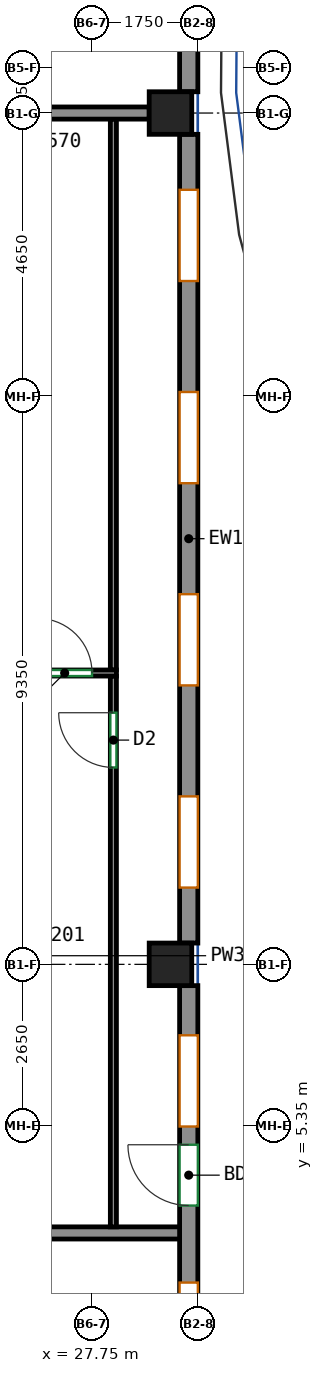
"""IFC4 building model, lengths in metres.
Left out: names, types, materials, properties, quantities, classifications, styles, units other than length and angle.
Written with IfcOpenShell. Run it as: python <this file> out.ifc"""

import sys

from ifc_helpers import new_model, si_unit, direction, frame, frame_2d, origin, origin_2d, place, context, subcontext, project, spatial, rectangle, extrude, source, transform, mapped, element, fill, save


model = new_model("IFC4")
c1 = context("Model", 3, precision=1e-05, world=origin(), true_north=direction((0.0, 1.0)))
c2 = subcontext(c1, "Body", "Model", "MODEL_VIEW")
j1 = project(units=[si_unit("LENGTHUNIT", "METRE"), si_unit("PLANEANGLEUNIT", "RADIAN")], contexts=[c1])
p1 = place(None, origin())
s1 = spatial("IfcSite", under=j1, at=p1, CompositionType="ELEMENT")
p2 = place(p1, origin())
s2 = spatial("IfcBuilding", under=s1, at=p2, CompositionType="ELEMENT")
p3 = place(p2, frame((0.0, 0.0, 256.0)))
s3 = spatial("IfcBuildingStorey", under=s2, at=p3, CompositionType="ELEMENT", Elevation=256.0)
m1 = source(origin(), c2, "Body", "SweptSolid", [
    extrude(rectangle(XDim=0.7, YDim=0.7, at=origin_2d()), origin(), (0.0, 0.0, 1.0), 3.12),
])
for number, where, z_axis, x_axis in (
    (1, (29.05, 8.0, 0.0), (0.0, 0.0, 1.0), (1.0, 0.0, 0.0)),
    (2, (29.05, 22.0, 0.0), (0.0, 0.0, 1.0), (1.0, 0.0, 0.0)),
):
    element("IfcColumn", number, at=place(p3, frame(where, z_axis=z_axis, x_axis=x_axis)), inside=s3, PredefinedType="COLUMN", context=c2, shape_type="MappedRepresentation", body=[
        mapped(m1, transform((0.0, 0.0, 0.0))),
    ])
m2 = source(origin(), c2, "Body", "SweptSolid", [
    extrude(rectangle(XDim=8.133, YDim=0.3, at=frame_2d((4.067, 0.0))), origin(), (0.0, 0.0, 1.0), 3.12),
])
p4 = place(p3, frame((29.35, -0.483, 0.0), z_axis=(0.0, 0.0, 1.0), x_axis=(0.0, 1.0, 0.0)))
e3 = element("IfcWall", 3, at=p4, inside=s3, PredefinedType="SOLIDWALL", context=c2, shape_type="MappedRepresentation", body=[
    mapped(m2, transform((0.0, 0.0, 0.0))),
])
p5 = place(p4, frame((1.75, 0.0, 0.8)))
e4 = element("IfcOpeningElement", 4, at=p5, cuts=e3, PredefinedType="OPENING", context=c2, shape_type="SweptSolid", body=[
    extrude(rectangle(XDim=1.5, YDim=2.05, at=frame_2d((0.75, 1.025))), frame((0.0, 0.16, 0.0), z_axis=(0.0, -1.0, 0.0), x_axis=(1.0, 0.0, 0.0)), (0.0, 0.0, 1.0), 0.32),
])
p6 = place(p4, frame((5.817, 0.0, 0.8)))
e5 = element("IfcOpeningElement", 5, at=p6, cuts=e3, PredefinedType="OPENING", context=c2, shape_type="SweptSolid", body=[
    extrude(rectangle(XDim=1.5, YDim=2.05, at=frame_2d((0.75, 1.025))), frame((0.0, 0.16, 0.0), z_axis=(0.0, -1.0, 0.0), x_axis=(1.0, 0.0, 0.0)), (0.0, 0.0, 1.0), 0.32),
])
p7 = place(p4, frame((4.517, 0.0, 0.0)))
e6 = element("IfcOpeningElement", 6, at=p7, cuts=e3, PredefinedType="OPENING", context=c2, shape_type="SweptSolid", body=[
    extrude(rectangle(XDim=1.0, YDim=2.1, at=frame_2d((0.5, 1.05))), frame((0.0, 0.16, 0.0), z_axis=(0.0, -1.0, 0.0), x_axis=(1.0, 0.0, 0.0)), (0.0, 0.0, 1.0), 0.32),
])
m3 = source(origin(), c2, "Body", "SweptSolid", [
    extrude(rectangle(XDim=13.3, YDim=0.3, at=frame_2d((6.65, 0.0))), origin(), (0.0, 0.0, 1.0), 3.12),
])
p8 = place(p3, frame((29.35, 8.35, 0.0), z_axis=(0.0, 0.0, 1.0), x_axis=(0.0, 1.0, 0.0)))
e7 = element("IfcWall", 7, at=p8, inside=s3, PredefinedType="SOLIDWALL", context=c2, shape_type="MappedRepresentation", body=[
    mapped(m3, transform((0.0, 0.0, 0.0))),
])
p9 = place(p8, frame((0.913, 0.0, 0.8)))
e8 = element("IfcOpeningElement", 8, at=p9, cuts=e7, PredefinedType="OPENING", context=c2, shape_type="SweptSolid", body=[
    extrude(rectangle(XDim=1.5, YDim=2.05, at=frame_2d((0.75, 1.025))), frame((0.0, 0.16, 0.0), z_axis=(0.0, -1.0, 0.0), x_axis=(1.0, 0.0, 0.0)), (0.0, 0.0, 1.0), 0.32),
])
p10 = place(p8, frame((4.238, 0.0, 0.8)))
e9 = element("IfcOpeningElement", 9, at=p10, cuts=e7, PredefinedType="OPENING", context=c2, shape_type="SweptSolid", body=[
    extrude(rectangle(XDim=1.5, YDim=2.05, at=frame_2d((0.75, 1.025))), frame((0.0, 0.16, 0.0), z_axis=(0.0, -1.0, 0.0), x_axis=(1.0, 0.0, 0.0)), (0.0, 0.0, 1.0), 0.32),
])
p11 = place(p8, frame((7.562, 0.0, 0.8)))
e10 = element("IfcOpeningElement", 10, at=p11, cuts=e7, PredefinedType="OPENING", context=c2, shape_type="SweptSolid", body=[
    extrude(rectangle(XDim=1.5, YDim=2.05, at=frame_2d((0.75, 1.025))), frame((0.0, 0.16, 0.0), z_axis=(0.0, -1.0, 0.0), x_axis=(1.0, 0.0, 0.0)), (0.0, 0.0, 1.0), 0.32),
])
p12 = place(p8, frame((10.887, 0.0, 0.8)))
e11 = element("IfcOpeningElement", 11, at=p12, cuts=e7, PredefinedType="OPENING", context=c2, shape_type="SweptSolid", body=[
    extrude(rectangle(XDim=1.5, YDim=2.05, at=frame_2d((0.75, 1.025))), frame((0.0, 0.16, 0.0), z_axis=(0.0, -1.0, 0.0), x_axis=(1.0, 0.0, 0.0)), (0.0, 0.0, 1.0), 0.32),
])
m4 = source(origin(), c2, "Body", "SweptSolid", [
    extrude(rectangle(XDim=4.3, YDim=0.3, at=frame_2d((2.15, 0.0))), origin(), (0.0, 0.0, 1.0), 3.12),
])
p13 = place(p3, frame((29.35, 22.35, 0.0), z_axis=(0.0, 0.0, 1.0), x_axis=(0.0, 1.0, 0.0)))
e12 = element("IfcWall", 12, at=p13, inside=s3, PredefinedType="SOLIDWALL", context=c2, shape_type="MappedRepresentation", body=[
    mapped(m4, transform((0.0, 0.0, 0.0))),
])
p14 = place(p13, frame((1.75, 0.0, 0.8)))
e13 = element("IfcOpeningElement", 13, at=p14, cuts=e12, PredefinedType="OPENING", context=c2, shape_type="SweptSolid", body=[
    extrude(rectangle(XDim=1.5, YDim=2.05, at=frame_2d((0.75, 1.025))), frame((0.0, 0.16, 0.0), z_axis=(0.0, -1.0, 0.0), x_axis=(1.0, 0.0, 0.0)), (0.0, 0.0, 1.0), 0.32),
])
p15 = place(p3, frame((20.727, 3.583, 0.0), z_axis=(0.0, 0.0, 1.0), x_axis=(1.0, 0.0, 0.0)))
e14 = element("IfcWall", 14, at=p15, inside=s3, PredefinedType="PARTITIONING", context=c2, shape_type="SweptSolid", body=[
    extrude(rectangle(XDim=8.523, YDim=0.2, at=frame_2d((4.261, 0.0))), origin(), (0.0, 0.0, 1.0), 3.12),
])
p16 = place(p3, frame((28.111, 3.683, 0.0), z_axis=(0.0, 0.0, 1.0), x_axis=(0.0, 1.0, 0.0)))
e15 = element("IfcWall", 15, at=p16, inside=s3, PredefinedType="PARTITIONING", context=c2, shape_type="SweptSolid", body=[
    extrude(rectangle(XDim=9.058, YDim=0.1, at=frame_2d((4.529, 0.0))), origin(), (0.0, 0.0, 1.0), 3.12),
])
p17 = place(p16, frame((7.555, 0.0, 0.0)))
e16 = element("IfcOpeningElement", 16, at=p17, cuts=e15, PredefinedType="OPENING", context=c2, shape_type="SweptSolid", body=[
    extrude(rectangle(XDim=0.9, YDim=2.1, at=frame_2d((0.45, 1.05))), frame((0.0, 0.06, 0.0), z_axis=(0.0, -1.0, 0.0), x_axis=(1.0, 0.0, 0.0)), (0.0, 0.0, 1.0), 0.12),
])
p18 = place(p3, frame((28.111, 12.841, 0.0), z_axis=(0.0, 0.0, 1.0), x_axis=(0.0, 1.0, 0.0)))
e17 = element("IfcWall", 17, at=p18, inside=s3, PredefinedType="PARTITIONING", context=c2, shape_type="SweptSolid", body=[
    extrude(rectangle(XDim=9.059, YDim=0.1, at=frame_2d((4.529, 0.0))), origin(), (0.0, 0.0, 1.0), 3.12),
])
p19 = place(p3, frame((20.727, 22.0, 0.0), z_axis=(0.0, 0.0, 1.0), x_axis=(1.0, 0.0, 0.0)))
e18 = element("IfcWall", 18, at=p19, inside=s3, PredefinedType="PARTITIONING", context=c2, shape_type="SweptSolid", body=[
    extrude(rectangle(XDim=7.973, YDim=0.2, at=frame_2d((3.986, 0.0))), origin(), (0.0, 0.0, 1.0), 2.57),
])
p20 = place(p3, frame((21.7, 12.791, 0.0), z_axis=(0.0, 0.0, 1.0), x_axis=(1.0, 0.0, 0.0)))
e19 = element("IfcWall", 19, at=p20, inside=s3, PredefinedType="PARTITIONING", context=c2, shape_type="SweptSolid", body=[
    extrude(rectangle(XDim=6.461, YDim=0.1, at=frame_2d((3.23, 0.0))), origin(), (0.0, 0.0, 1.0), 3.12),
])
p21 = place(p20, frame((5.16, 0.0, 0.0)))
e20 = element("IfcOpeningElement", 20, at=p21, cuts=e19, PredefinedType="OPENING", context=c2, shape_type="SweptSolid", body=[
    extrude(rectangle(XDim=0.9, YDim=2.1, at=frame_2d((0.45, 1.05))), frame((0.0, 0.06, 0.0), z_axis=(0.0, -1.0, 0.0), x_axis=(1.0, 0.0, 0.0)), (0.0, 0.0, 1.0), 0.12),
])
p22 = place(p5, origin())
e21 = element("IfcWindow", 21, at=p22, inside=s3, PartitioningType="SINGLE_PANEL", PredefinedType="WINDOW", context=c2, shape_type="SweptSolid", body=[
    extrude(rectangle(XDim=1.5, YDim=2.05, at=frame_2d((0.75, 1.025))), frame((0.0, 0.03, 0.0), z_axis=(0.0, -1.0, 0.0), x_axis=(1.0, 0.0, 0.0)), (0.0, 0.0, 1.0), 0.06),
])
fill(e4, e21)
p23 = place(p6, origin())
e22 = element("IfcWindow", 22, at=p23, inside=s3, PartitioningType="SINGLE_PANEL", PredefinedType="WINDOW", context=c2, shape_type="SweptSolid", body=[
    extrude(rectangle(XDim=1.5, YDim=2.05, at=frame_2d((0.75, 1.025))), frame((0.0, 0.03, 0.0), z_axis=(0.0, -1.0, 0.0), x_axis=(1.0, 0.0, 0.0)), (0.0, 0.0, 1.0), 0.06),
])
fill(e5, e22)
p24 = place(p7, origin())
e23 = element("IfcDoor", 23, at=p24, inside=s3, OperationType="SINGLE_SWING_RIGHT", PredefinedType="DOOR", context=c2, shape_type="SweptSolid", body=[
    extrude(rectangle(XDim=1.0, YDim=2.1, at=frame_2d((0.5, 1.05))), frame((0.0, 0.025, 0.0), z_axis=(0.0, -1.0, 0.0), x_axis=(1.0, 0.0, 0.0)), (0.0, 0.0, 1.0), 0.05),
])
fill(e6, e23)
p25 = place(p9, origin())
e24 = element("IfcWindow", 24, at=p25, inside=s3, PartitioningType="SINGLE_PANEL", PredefinedType="WINDOW", context=c2, shape_type="SweptSolid", body=[
    extrude(rectangle(XDim=1.5, YDim=2.05, at=frame_2d((0.75, 1.025))), frame((0.0, 0.03, 0.0), z_axis=(0.0, -1.0, 0.0), x_axis=(1.0, 0.0, 0.0)), (0.0, 0.0, 1.0), 0.06),
])
fill(e8, e24)
p26 = place(p10, origin())
e25 = element("IfcWindow", 25, at=p26, inside=s3, PartitioningType="SINGLE_PANEL", PredefinedType="WINDOW", context=c2, shape_type="SweptSolid", body=[
    extrude(rectangle(XDim=1.5, YDim=2.05, at=frame_2d((0.75, 1.025))), frame((0.0, 0.03, 0.0), z_axis=(0.0, -1.0, 0.0), x_axis=(1.0, 0.0, 0.0)), (0.0, 0.0, 1.0), 0.06),
])
fill(e9, e25)
p27 = place(p11, origin())
e26 = element("IfcWindow", 26, at=p27, inside=s3, PartitioningType="SINGLE_PANEL", PredefinedType="WINDOW", context=c2, shape_type="SweptSolid", body=[
    extrude(rectangle(XDim=1.5, YDim=2.05, at=frame_2d((0.75, 1.025))), frame((0.0, 0.03, 0.0), z_axis=(0.0, -1.0, 0.0), x_axis=(1.0, 0.0, 0.0)), (0.0, 0.0, 1.0), 0.06),
])
fill(e10, e26)
p28 = place(p12, origin())
e27 = element("IfcWindow", 27, at=p28, inside=s3, PartitioningType="SINGLE_PANEL", PredefinedType="WINDOW", context=c2, shape_type="SweptSolid", body=[
    extrude(rectangle(XDim=1.5, YDim=2.05, at=frame_2d((0.75, 1.025))), frame((0.0, 0.03, 0.0), z_axis=(0.0, -1.0, 0.0), x_axis=(1.0, 0.0, 0.0)), (0.0, 0.0, 1.0), 0.06),
])
fill(e11, e27)
p29 = place(p17, origin())
e28 = element("IfcDoor", 28, at=p29, inside=s3, OperationType="SINGLE_SWING_RIGHT", PredefinedType="DOOR", context=c2, shape_type="SweptSolid", body=[
    extrude(rectangle(XDim=0.9, YDim=2.1, at=frame_2d((0.45, 1.05))), frame((0.0, 0.025, 0.0), z_axis=(0.0, -1.0, 0.0), x_axis=(1.0, 0.0, 0.0)), (0.0, 0.0, 1.0), 0.05),
])
fill(e16, e28)
p30 = place(p21, origin())
e29 = element("IfcDoor", 29, at=p30, inside=s3, OperationType="SINGLE_SWING_LEFT", PredefinedType="DOOR", context=c2, shape_type="SweptSolid", body=[
    extrude(rectangle(XDim=0.9, YDim=2.1, at=frame_2d((0.45, 1.05))), frame((0.0, 0.025, 0.0), z_axis=(0.0, -1.0, 0.0), x_axis=(1.0, 0.0, 0.0)), (0.0, 0.0, 1.0), 0.05),
])
fill(e20, e29)
save(model, sys.argv[1])
